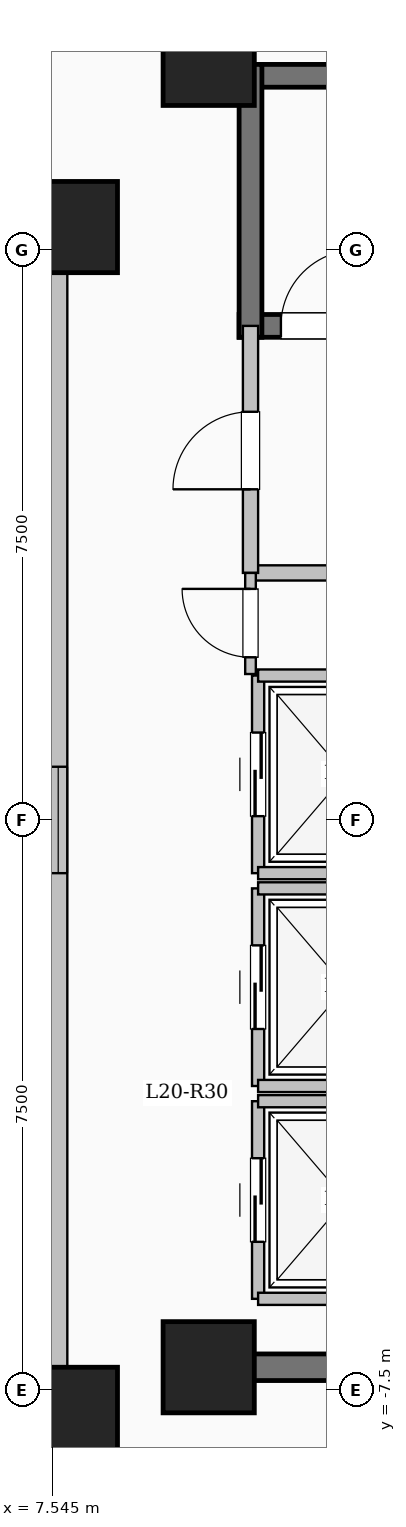
"""IFC4 building model, lengths in metres.
Left out: names, types, materials, properties, quantities, classifications, styles, units other than length and angle.
Written with IfcOpenShell. Run it as: python <this file> out.ifc"""

import sys

from ifc_helpers import new_model, si_unit, direction, frame, frame_2d, origin, origin_2d, place, context, subcontext, project, spatial, rectangle, extrude, element, fill, save


model = new_model("IFC4")
c1 = context("Model", 3, precision=1e-05, world=origin(), true_north=direction((0.0, 1.0)))
c2 = subcontext(c1, "Body", "Model", "MODEL_VIEW")
j1 = project(units=[si_unit("LENGTHUNIT", "METRE"), si_unit("PLANEANGLEUNIT", "RADIAN")], contexts=[c1])
p1 = place(None, origin())
s1 = spatial("IfcSite", under=j1, at=p1, CompositionType="ELEMENT")
p2 = place(p1, origin())
s2 = spatial("IfcBuilding", under=s1, at=p2, CompositionType="ELEMENT")
p3 = place(p2, frame((0.0, 0.0, 78.3)))
s3 = spatial("IfcBuildingStorey", under=s2, at=p3, CompositionType="ELEMENT", Elevation=78.3)
for number, where, z_axis, x_axis in (
    (1, (7.8, -7.8, 0.0), (0.0, 0.0, 1.0), (1.0, 0.0, 0.0)),
    (2, (7.8, 7.8, 0.0), (0.0, 0.0, 1.0), (1.0, 0.0, 0.0)),
    (3, (9.6, -7.2, 0.0), (0.0, 0.0, 1.0), (1.0, 0.0, 0.0)),
    (4, (9.6, 10.0, 0.0), (0.0, 0.0, 1.0), (1.0, 0.0, 0.0)),
):
    element("IfcColumn", number, at=place(p3, frame(where, z_axis=z_axis, x_axis=x_axis)), inside=s3, PredefinedType="COLUMN", context=c2, shape_type="SweptSolid", body=[
        extrude(rectangle(XDim=1.2, YDim=1.2, at=origin_2d()), origin(), (0.0, 0.0, 1.0), 3.35),
    ])
p4 = place(p3, frame((-7.62, -7.62, 0.0), z_axis=(0.0, 0.0, 1.0), x_axis=(1.0, 0.0, 0.0)))
e5 = element("IfcWall", 5, at=p4, inside=s3, PredefinedType="SOLIDWALL", context=c2, shape_type="SweptSolid", body=[
    extrude(rectangle(XDim=15.24, YDim=0.24, at=frame_2d((7.62, 0.0))), origin(), (0.0, 0.0, 1.0), 3.1),
])
p5 = place(p4, frame((6.92, 0.0, 0.95)))
e6 = element("IfcOpeningElement", 6, at=p5, cuts=e5, PredefinedType="OPENING", context=c2, shape_type="SweptSolid", body=[
    extrude(rectangle(XDim=1.4, YDim=1.5, at=frame_2d((0.7, 0.75))), frame((0.0, 0.13, 0.0), z_axis=(0.0, -1.0, 0.0), x_axis=(1.0, 0.0, 0.0)), (0.0, 0.0, 1.0), 0.26),
])
p6 = place(p3, frame((7.62, -7.62, 0.0), z_axis=(0.0, 0.0, 1.0), x_axis=(0.0, 1.0, 0.0)))
e7 = element("IfcWall", 7, at=p6, inside=s3, PredefinedType="SOLIDWALL", context=c2, shape_type="SweptSolid", body=[
    extrude(rectangle(XDim=15.24, YDim=0.24, at=frame_2d((7.62, 0.0))), origin(), (0.0, 0.0, 1.0), 3.1),
])
p7 = place(p6, frame((6.92, 0.0, 0.95)))
e8 = element("IfcOpeningElement", 8, at=p7, cuts=e7, PredefinedType="OPENING", context=c2, shape_type="SweptSolid", body=[
    extrude(rectangle(XDim=1.4, YDim=1.5, at=frame_2d((0.7, 0.75))), frame((0.0, 0.13, 0.0), z_axis=(0.0, -1.0, 0.0), x_axis=(1.0, 0.0, 0.0)), (0.0, 0.0, 1.0), 0.26),
])
p8 = place(p3, frame((7.62, 7.62, 0.0), z_axis=(0.0, 0.0, 1.0), x_axis=(-1.0, 0.0, 0.0)))
e9 = element("IfcWall", 9, at=p8, inside=s3, PredefinedType="SOLIDWALL", context=c2, shape_type="SweptSolid", body=[
    extrude(rectangle(XDim=15.24, YDim=0.24, at=frame_2d((7.62, 0.0))), origin(), (0.0, 0.0, 1.0), 3.1),
])
p9 = place(p8, frame((6.92, 0.0, 0.95)))
e10 = element("IfcOpeningElement", 10, at=p9, cuts=e9, PredefinedType="OPENING", context=c2, shape_type="SweptSolid", body=[
    extrude(rectangle(XDim=1.4, YDim=1.5, at=frame_2d((0.7, 0.75))), frame((0.0, 0.13, 0.0), z_axis=(0.0, -1.0, 0.0), x_axis=(1.0, 0.0, 0.0)), (0.0, 0.0, 1.0), 0.26),
])
p10 = place(p3, frame((10.0, 9.79, 0.0), z_axis=(0.0, 0.0, 1.0), x_axis=(1.0, 0.0, 0.0)))
e11 = element("IfcWall", 11, at=p10, inside=s3, PredefinedType="SHEAR", context=c2, shape_type="SweptSolid", body=[
    extrude(rectangle(XDim=8.0, YDim=0.3, at=frame_2d((4.0, 0.0))), origin(), (0.0, 0.0, 1.0), 3.35),
])
p11 = place(p3, frame((10.0, 6.5, 0.0), z_axis=(0.0, 0.0, 1.0), x_axis=(1.0, 0.0, 0.0)))
e12 = element("IfcWall", 12, at=p11, inside=s3, PredefinedType="SHEAR", context=c2, shape_type="SweptSolid", body=[
    extrude(rectangle(XDim=8.0, YDim=0.3, at=frame_2d((4.0, 0.0))), origin(), (0.0, 0.0, 1.0), 3.35),
])
p12 = place(p11, frame((0.55, 0.0, 0.0)))
e13 = element("IfcOpeningElement", 13, at=p12, cuts=e12, PredefinedType="OPENING", context=c2, shape_type="SweptSolid", body=[
    extrude(rectangle(XDim=1.0, YDim=2.15, at=frame_2d((0.5, 1.075))), frame((0.0, 0.16, 0.0), z_axis=(0.0, -1.0, 0.0), x_axis=(1.0, 0.0, 0.0)), (0.0, 0.0, 1.0), 0.32),
])
p13 = place(p3, frame((10.15, 6.35, 0.0), z_axis=(0.0, 0.0, 1.0), x_axis=(0.0, 1.0, 0.0)))
e14 = element("IfcWall", 14, at=p13, inside=s3, PredefinedType="SHEAR", context=c2, shape_type="SweptSolid", body=[
    extrude(rectangle(XDim=3.59, YDim=0.3, at=frame_2d((1.795, 0.0))), origin(), (0.0, 0.0, 1.0), 3.35),
])
p14 = place(p3, frame((10.15, 3.25, 0.0), z_axis=(0.0, 0.0, 1.0), x_axis=(1.0, 0.0, 0.0)))
e15 = element("IfcWall", 15, at=p14, inside=s3, PredefinedType="SOLIDWALL", context=c2, shape_type="SweptSolid", body=[
    extrude(rectangle(XDim=5.4, YDim=0.2, at=frame_2d((2.7, 0.0))), origin(), (0.0, 0.0, 1.0), 3.1),
])
p15 = place(p3, frame((10.15, 3.25, 0.0), z_axis=(0.0, 0.0, 1.0), x_axis=(0.0, 1.0, 0.0)))
e16 = element("IfcWall", 16, at=p15, inside=s3, PredefinedType="SOLIDWALL", context=c2, shape_type="SweptSolid", body=[
    extrude(rectangle(XDim=3.25, YDim=0.2, at=frame_2d((1.625, 0.0))), origin(), (0.0, 0.0, 1.0), 3.1),
])
p16 = place(p15, frame((1.1, 0.0, 0.0)))
e17 = element("IfcOpeningElement", 17, at=p16, cuts=e16, PredefinedType="OPENING", context=c2, shape_type="SweptSolid", body=[
    extrude(rectangle(XDim=1.02, YDim=2.15, at=frame_2d((0.51, 1.075))), frame((0.0, 0.11, 0.0), z_axis=(0.0, -1.0, 0.0), x_axis=(1.0, 0.0, 0.0)), (0.0, 0.0, 1.0), 0.22),
])
p17 = place(p3, frame((10.25, -6.3, 0.0), z_axis=(0.0, 0.0, 1.0), x_axis=(0.0, 1.0, 0.0)))
e18 = element("IfcWall", 18, at=p17, inside=s3, PredefinedType="SOLIDWALL", context=c2, shape_type="SweptSolid", body=[
    extrude(rectangle(XDim=2.6, YDim=0.16, at=frame_2d((1.3, 0.0))), origin(), (0.0, 0.0, 1.0), 3.1),
])
p18 = place(p17, frame((0.75, 0.0, 0.0)))
e19 = element("IfcOpeningElement", 19, at=p18, cuts=e18, PredefinedType="OPENING", context=c2, shape_type="SweptSolid", body=[
    extrude(rectangle(XDim=1.1, YDim=2.15, at=frame_2d((0.55, 1.075))), frame((0.0, 0.09, 0.0), z_axis=(0.0, -1.0, 0.0), x_axis=(1.0, 0.0, 0.0)), (0.0, 0.0, 1.0), 0.18),
])
for number, where, z_axis, x_axis in (
    (20, (10.25, -6.3, 0.0), (0.0, 0.0, 1.0), (1.0, 0.0, 0.0)),
    (21, (10.25, -3.7, 0.0), (0.0, 0.0, 1.0), (1.0, 0.0, 0.0)),
):
    element("IfcWall", number, at=place(p3, frame(where, z_axis=z_axis, x_axis=x_axis)), inside=s3, PredefinedType="SOLIDWALL", context=c2, shape_type="SweptSolid", body=[
        extrude(rectangle(XDim=2.3, YDim=0.16, at=frame_2d((1.15, 0.0))), origin(), (0.0, 0.0, 1.0), 3.1),
    ])
p19 = place(p3, frame((10.25, -3.5, 0.0), z_axis=(0.0, 0.0, 1.0), x_axis=(0.0, 1.0, 0.0)))
e22 = element("IfcWall", 22, at=p19, inside=s3, PredefinedType="SOLIDWALL", context=c2, shape_type="SweptSolid", body=[
    extrude(rectangle(XDim=2.6, YDim=0.16, at=frame_2d((1.3, 0.0))), origin(), (0.0, 0.0, 1.0), 3.1),
])
p20 = place(p19, frame((0.75, 0.0, 0.0)))
e23 = element("IfcOpeningElement", 23, at=p20, cuts=e22, PredefinedType="OPENING", context=c2, shape_type="SweptSolid", body=[
    extrude(rectangle(XDim=1.1, YDim=2.15, at=frame_2d((0.55, 1.075))), frame((0.0, 0.09, 0.0), z_axis=(0.0, -1.0, 0.0), x_axis=(1.0, 0.0, 0.0)), (0.0, 0.0, 1.0), 0.18),
])
for number, where, z_axis, x_axis in (
    (24, (10.25, -3.5, 0.0), (0.0, 0.0, 1.0), (1.0, 0.0, 0.0)),
    (25, (10.25, -0.9, 0.0), (0.0, 0.0, 1.0), (1.0, 0.0, 0.0)),
):
    element("IfcWall", number, at=place(p3, frame(where, z_axis=z_axis, x_axis=x_axis)), inside=s3, PredefinedType="SOLIDWALL", context=c2, shape_type="SweptSolid", body=[
        extrude(rectangle(XDim=2.3, YDim=0.16, at=frame_2d((1.15, 0.0))), origin(), (0.0, 0.0, 1.0), 3.1),
    ])
p21 = place(p3, frame((10.25, -0.7, 0.0), z_axis=(0.0, 0.0, 1.0), x_axis=(0.0, 1.0, 0.0)))
e26 = element("IfcWall", 26, at=p21, inside=s3, PredefinedType="SOLIDWALL", context=c2, shape_type="SweptSolid", body=[
    extrude(rectangle(XDim=2.6, YDim=0.16, at=frame_2d((1.3, 0.0))), origin(), (0.0, 0.0, 1.0), 3.1),
])
p22 = place(p21, frame((0.75, 0.0, 0.0)))
e27 = element("IfcOpeningElement", 27, at=p22, cuts=e26, PredefinedType="OPENING", context=c2, shape_type="SweptSolid", body=[
    extrude(rectangle(XDim=1.1, YDim=2.15, at=frame_2d((0.55, 1.075))), frame((0.0, 0.09, 0.0), z_axis=(0.0, -1.0, 0.0), x_axis=(1.0, 0.0, 0.0)), (0.0, 0.0, 1.0), 0.18),
])
for number, where, z_axis, x_axis in (
    (28, (10.25, -0.7, 0.0), (0.0, 0.0, 1.0), (1.0, 0.0, 0.0)),
    (29, (10.25, 1.9, 0.0), (0.0, 0.0, 1.0), (1.0, 0.0, 0.0)),
):
    element("IfcWall", number, at=place(p3, frame(where, z_axis=z_axis, x_axis=x_axis)), inside=s3, PredefinedType="SOLIDWALL", context=c2, shape_type="SweptSolid", body=[
        extrude(rectangle(XDim=2.3, YDim=0.16, at=frame_2d((1.15, 0.0))), origin(), (0.0, 0.0, 1.0), 3.1),
    ])
p23 = place(p3, frame((10.075, -7.2, 0.0), z_axis=(0.0, 0.0, 1.0), x_axis=(1.0, 0.0, 0.0)))
e30 = element("IfcWall", 30, at=p23, inside=s3, PredefinedType="SHEAR", context=c2, shape_type="SweptSolid", body=[
    extrude(rectangle(XDim=8.55, YDim=0.35, at=frame_2d((4.275, 0.0))), origin(), (0.0, 0.0, 1.0), 3.35),
])
p24 = place(p3, frame((10.15, 1.92, 0.0), z_axis=(0.0, 0.0, 1.0), x_axis=(0.0, 1.0, 0.0)))
e31 = element("IfcWall", 31, at=p24, inside=s3, PredefinedType="PARTITIONING", context=c2, shape_type="SweptSolid", body=[
    extrude(rectangle(XDim=1.33, YDim=0.14, at=frame_2d((0.665, 0.0))), origin(), (0.0, 0.0, 1.0), 3.1),
])
p25 = place(p24, frame((0.22, 0.0, 0.0)))
e32 = element("IfcOpeningElement", 32, at=p25, cuts=e31, PredefinedType="OPENING", context=c2, shape_type="SweptSolid", body=[
    extrude(rectangle(XDim=0.9, YDim=2.08, at=frame_2d((0.45, 1.04))), frame((0.0, 0.08, 0.0), z_axis=(0.0, -1.0, 0.0), x_axis=(1.0, 0.0, 0.0)), (0.0, 0.0, 1.0), 0.16),
])
p26 = place(p7, origin())
e33 = element("IfcWindow", 33, at=p26, inside=s3, PartitioningType="SINGLE_PANEL", PredefinedType="WINDOW", context=c2, shape_type="SweptSolid", body=[
    extrude(rectangle(XDim=1.4, YDim=1.5, at=frame_2d((0.7, 0.75))), frame((0.0, 0.03, 0.0), z_axis=(0.0, -1.0, 0.0), x_axis=(1.0, 0.0, 0.0)), (0.0, 0.0, 1.0), 0.06),
])
fill(e8, e33)
p27 = place(p12, origin())
e34 = element("IfcDoor", 34, at=p27, inside=s3, OperationType="SINGLE_SWING_RIGHT", PredefinedType="DOOR", context=c2, shape_type="SweptSolid", body=[
    extrude(rectangle(XDim=1.0, YDim=2.15, at=frame_2d((0.5, 1.075))), frame((0.0, 0.025, 0.0), z_axis=(0.0, -1.0, 0.0), x_axis=(1.0, 0.0, 0.0)), (0.0, 0.0, 1.0), 0.05),
])
fill(e13, e34)
p28 = place(p16, origin())
e35 = element("IfcDoor", 35, at=p28, inside=s3, OperationType="SINGLE_SWING_LEFT", PredefinedType="DOOR", context=c2, shape_type="SweptSolid", body=[
    extrude(rectangle(XDim=1.02, YDim=2.15, at=frame_2d((0.51, 1.075))), frame((0.0, 0.025, 0.0), z_axis=(0.0, -1.0, 0.0), x_axis=(1.0, 0.0, 0.0)), (0.0, 0.0, 1.0), 0.05),
])
fill(e17, e35)
p29 = place(p18, origin())
e36 = element("IfcDoor", 36, at=p29, inside=s3, OperationType="SLIDING_TO_LEFT", PredefinedType="DOOR", context=c2, shape_type="SweptSolid", body=[
    extrude(rectangle(XDim=1.1, YDim=2.15, at=frame_2d((0.55, 1.075))), frame((0.0, 0.025, 0.0), z_axis=(0.0, -1.0, 0.0), x_axis=(1.0, 0.0, 0.0)), (0.0, 0.0, 1.0), 0.05),
])
fill(e19, e36)
p30 = place(p20, origin())
e37 = element("IfcDoor", 37, at=p30, inside=s3, OperationType="SLIDING_TO_LEFT", PredefinedType="DOOR", context=c2, shape_type="SweptSolid", body=[
    extrude(rectangle(XDim=1.1, YDim=2.15, at=frame_2d((0.55, 1.075))), frame((0.0, 0.025, 0.0), z_axis=(0.0, -1.0, 0.0), x_axis=(1.0, 0.0, 0.0)), (0.0, 0.0, 1.0), 0.05),
])
fill(e23, e37)
p31 = place(p22, origin())
e38 = element("IfcDoor", 38, at=p31, inside=s3, OperationType="SLIDING_TO_LEFT", PredefinedType="DOOR", context=c2, shape_type="SweptSolid", body=[
    extrude(rectangle(XDim=1.1, YDim=2.15, at=frame_2d((0.55, 1.075))), frame((0.0, 0.025, 0.0), z_axis=(0.0, -1.0, 0.0), x_axis=(1.0, 0.0, 0.0)), (0.0, 0.0, 1.0), 0.05),
])
fill(e27, e38)
p32 = place(p25, origin())
e39 = element("IfcDoor", 39, at=p32, inside=s3, OperationType="SINGLE_SWING_RIGHT", PredefinedType="DOOR", context=c2, shape_type="SweptSolid", body=[
    extrude(rectangle(XDim=0.9, YDim=2.08, at=frame_2d((0.45, 1.04))), frame((0.0, 0.025, 0.0), z_axis=(0.0, -1.0, 0.0), x_axis=(1.0, 0.0, 0.0)), (0.0, 0.0, 1.0), 0.05),
])
fill(e32, e39)
save(model, sys.argv[1])
